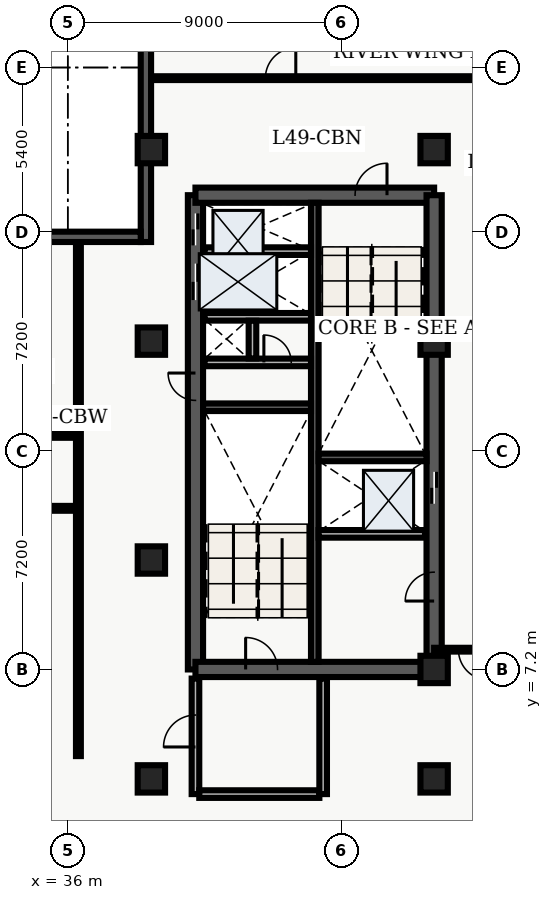
"""IFC4 building model, lengths in metres.
Left out: names, types, materials, properties, quantities, classifications, styles, units other than length and angle.
Written with IfcOpenShell. Run it as: python <this file> out.ifc"""

import sys

from ifc_helpers import new_model, entity, si_unit, converted_unit, direction, frame, origin_with_axes, origin_2d_with_axis, place, context, subcontext, project, spatial, polyline, rectangle, outline, extrude, element, fill, save


model = new_model("IFC4")
c1 = context("Model", 3, precision=1e-05, world=origin_with_axes(), true_north=direction((0.0, 1.0)))
c2 = subcontext(c1, "Body", "Model", "MODEL_VIEW")
j1 = project(units=[si_unit("LENGTHUNIT", "METRE"), converted_unit("PLANEANGLEUNIT", "DEGREE", entity("IfcPlaneAngleMeasure", 0.017), si_unit("PLANEANGLEUNIT", "RADIAN"), dimensions=[0, 0, 0, 0, 0, 0, 0])], contexts=[c1])
p1 = place(None, origin_with_axes())
s1 = spatial("IfcSite", under=j1, at=p1, CompositionType="ELEMENT")
p2 = place(p1, origin_with_axes())
s2 = spatial("IfcBuilding", under=s1, at=p2, CompositionType="ELEMENT")
p3 = place(p2, frame((0.0, 0.0, 200.4), z_axis=(0.0, 0.0, 1.0), x_axis=(1.0, 0.0, 0.0)))
s3 = spatial("IfcBuildingStorey", under=s2, at=p3, CompositionType="ELEMENT", Elevation=200.4)
p4 = place(p3, frame((40.2, 7.2, 0.0), z_axis=(0.0, 0.0, 1.0), x_axis=(0.0, 1.0, 0.0)))
e1 = element("IfcWall", 1, at=p4, inside=s3, PredefinedType="SHEAR", context=c2, shape_type="SweptSolid", body=[
    extrude(outline(polyline([(0.0, -0.25), (15.6, -0.25), (15.6, 0.25), (0.0, 0.25), (0.0, -0.25)])), origin_with_axes(), (0.0, 0.0, 1.0), 3.66),
])
p5 = place(p4, frame((14.475, 0.0, 0.0), z_axis=(0.0, 0.0, 1.0), x_axis=(1.0, 0.0, 0.0)))
e2 = element("IfcOpeningElement", 2, at=p5, cuts=e1, PredefinedType="OPENING", context=c2, shape_type="SweptSolid", body=[
    extrude(rectangle(XDim=1.05, YDim=0.52, at=origin_2d_with_axis()), origin_with_axes(), (0.0, 0.0, 1.0), 2.15),
])
p6 = place(p4, frame((12.75, 0.0, 0.0), z_axis=(0.0, 0.0, 1.0), x_axis=(1.0, 0.0, 0.0)))
e3 = element("IfcOpeningElement", 3, at=p6, cuts=e1, PredefinedType="OPENING", context=c2, shape_type="SweptSolid", body=[
    extrude(rectangle(XDim=1.2, YDim=0.52, at=origin_2d_with_axis()), origin_with_axes(), (0.0, 0.0, 1.0), 2.15),
])
p7 = place(p4, frame((9.3, 0.0, 0.0), z_axis=(0.0, 0.0, 1.0), x_axis=(1.0, 0.0, 0.0)))
e4 = element("IfcOpeningElement", 4, at=p7, cuts=e1, PredefinedType="OPENING", context=c2, shape_type="SweptSolid", body=[
    extrude(rectangle(XDim=0.9, YDim=0.52, at=origin_2d_with_axis()), origin_with_axes(), (0.0, 0.0, 1.0), 2.15),
])
p8 = place(p3, frame((40.2, 7.2, 0.0), z_axis=(0.0, 0.0, 1.0), x_axis=(1.0, 0.0, 0.0)))
e5 = element("IfcWall", 5, at=p8, inside=s3, PredefinedType="SHEAR", context=c2, shape_type="SweptSolid", body=[
    extrude(outline(polyline([(0.0, -0.25), (7.85, -0.25), (7.85, 0.25), (0.0, 0.25), (0.0, -0.25)])), origin_with_axes(), (0.0, 0.0, 1.0), 3.66),
])
p9 = place(p8, frame((2.175, 0.0, 0.0), z_axis=(0.0, 0.0, 1.0), x_axis=(1.0, 0.0, 0.0)))
e6 = element("IfcOpeningElement", 6, at=p9, cuts=e5, PredefinedType="OPENING", context=c2, shape_type="SweptSolid", body=[
    extrude(rectangle(XDim=1.05, YDim=0.52, at=origin_2d_with_axis()), origin_with_axes(), (0.0, 0.0, 1.0), 2.15),
])
p10 = place(p3, frame((40.2, 22.8, 0.0), z_axis=(0.0, 0.0, 1.0), x_axis=(1.0, 0.0, 0.0)))
e7 = element("IfcWall", 7, at=p10, inside=s3, PredefinedType="SHEAR", context=c2, shape_type="SweptSolid", body=[
    extrude(outline(polyline([(0.0, -0.25), (7.85, -0.25), (7.85, 0.25), (0.0, 0.25), (0.0, -0.25)])), origin_with_axes(), (0.0, 0.0, 1.0), 3.66),
])
p11 = place(p10, frame((5.775, 0.0, 0.0), z_axis=(0.0, 0.0, 1.0), x_axis=(1.0, 0.0, 0.0)))
e8 = element("IfcOpeningElement", 8, at=p11, cuts=e7, PredefinedType="OPENING", context=c2, shape_type="SweptSolid", body=[
    extrude(rectangle(XDim=1.05, YDim=0.52, at=origin_2d_with_axis()), origin_with_axes(), (0.0, 0.0, 1.0), 2.15),
])
p12 = place(p3, frame((48.05, 7.2, 0.0), z_axis=(0.0, 0.0, 1.0), x_axis=(0.0, 1.0, 0.0)))
e9 = element("IfcWall", 9, at=p12, inside=s3, PredefinedType="SHEAR", context=c2, shape_type="SweptSolid", body=[
    extrude(outline(polyline([(0.0, -0.25), (15.6, -0.25), (15.6, 0.25), (0.0, 0.25), (0.0, -0.25)])), origin_with_axes(), (0.0, 0.0, 1.0), 3.66),
])
p13 = place(p12, frame((5.975, 0.0, 0.0), z_axis=(0.0, 0.0, 1.0), x_axis=(1.0, 0.0, 0.0)))
e10 = element("IfcOpeningElement", 10, at=p13, cuts=e9, PredefinedType="OPENING", context=c2, shape_type="SweptSolid", body=[
    extrude(rectangle(XDim=1.05, YDim=0.52, at=origin_2d_with_axis()), origin_with_axes(), (0.0, 0.0, 1.0), 2.15),
])
p14 = place(p12, frame((2.725, 0.0, 0.0), z_axis=(0.0, 0.0, 1.0), x_axis=(1.0, 0.0, 0.0)))
e11 = element("IfcOpeningElement", 11, at=p14, cuts=e9, PredefinedType="OPENING", context=c2, shape_type="SweptSolid", body=[
    extrude(rectangle(XDim=0.95, YDim=0.52, at=origin_2d_with_axis()), origin_with_axes(), (0.0, 0.0, 1.0), 2.15),
])
p15 = place(p3, frame((44.125, 7.45, 0.0), z_axis=(0.0, 0.0, 1.0), x_axis=(0.0, 1.0, 0.0)))
e12 = element("IfcWall", 12, at=p15, inside=s3, PredefinedType="SHEAR", context=c2, shape_type="SweptSolid", body=[
    extrude(outline(polyline([(0.0, -0.125), (15.1, -0.125), (15.1, 0.125), (0.0, 0.125), (0.0, -0.125)])), origin_with_axes(), (0.0, 0.0, 1.0), 3.66),
])
for number, where, z_axis, x_axis in (
    (13, (40.45, 15.825, 0.0), (0.0, 0.0, 1.0), (1.0, 0.0, 0.0)),
    (14, (44.25, 14.175, 0.0), (0.0, 0.0, 1.0), (1.0, 0.0, 0.0)),
):
    element("IfcWall", number, at=place(p3, frame(where, z_axis=z_axis, x_axis=x_axis)), inside=s3, PredefinedType="SHEAR", context=c2, shape_type="SweptSolid", body=[
        extrude(outline(polyline([(0.0, -0.125), (3.55, -0.125), (3.55, 0.125), (0.0, 0.125), (0.0, -0.125)])), origin_with_axes(), (0.0, 0.0, 1.0), 3.66),
    ])
p16 = place(p3, frame((40.5, 17.3, 0.0), z_axis=(0.0, 0.0, 1.0), x_axis=(1.0, 0.0, 0.0)))
e15 = element("IfcWall", 15, at=p16, inside=s3, PredefinedType="SOLIDWALL", context=c2, shape_type="SweptSolid", body=[
    extrude(outline(polyline([(0.0, -0.125), (3.5, -0.125), (3.5, 0.125), (0.0, 0.125), (0.0, -0.125)])), origin_with_axes(), (0.0, 0.0, 1.0), 2.7),
])
p17 = place(p16, frame((2.4, 0.0, 0.0), z_axis=(0.0, 0.0, 1.0), x_axis=(1.0, 0.0, 0.0)))
e16 = element("IfcOpeningElement", 16, at=p17, cuts=e15, PredefinedType="OPENING", context=c2, shape_type="SweptSolid", body=[
    extrude(rectangle(XDim=0.9, YDim=0.27, at=origin_2d_with_axis()), origin_with_axes(), (0.0, 0.0, 1.0), 2.15),
])
p18 = place(p3, frame((40.5, 18.8, 0.0), z_axis=(0.0, 0.0, 1.0), x_axis=(1.0, 0.0, 0.0)))
e17 = element("IfcWall", 17, at=p18, inside=s3, PredefinedType="SOLIDWALL", context=c2, shape_type="SweptSolid", body=[
    extrude(outline(polyline([(0.0, -0.125), (3.5, -0.125), (3.5, 0.125), (0.0, 0.125), (0.0, -0.125)])), origin_with_axes(), (0.0, 0.0, 1.0), 2.7),
])
p19 = place(p3, frame((42.075, 17.43, 0.0), z_axis=(0.0, 0.0, 1.0), x_axis=(0.0, 1.0, 0.0)))
e18 = element("IfcWall", 18, at=p19, inside=s3, PredefinedType="SOLIDWALL", context=c2, shape_type="SweptSolid", body=[
    extrude(outline(polyline([(0.0, -0.125), (1.24, -0.125), (1.24, 0.125), (0.0, 0.125), (0.0, -0.125)])), origin_with_axes(), (0.0, 0.0, 1.0), 2.7),
])
p20 = place(p3, frame((40.2, 3.1, 0.0), z_axis=(0.0, 0.0, 1.0), x_axis=(0.0, 1.0, 0.0)))
e19 = element("IfcWall", 19, at=p20, inside=s3, PredefinedType="SOLIDWALL", context=c2, shape_type="SweptSolid", body=[
    extrude(outline(polyline([(0.0, -0.125), (3.8, -0.125), (3.8, 0.125), (0.0, 0.125), (0.0, -0.125)])), origin_with_axes(), (0.0, 0.0, 1.0), 2.7),
])
p21 = place(p20, frame((2.075, 0.0, 0.0), z_axis=(0.0, 0.0, 1.0), x_axis=(1.0, 0.0, 0.0)))
e20 = element("IfcOpeningElement", 20, at=p21, cuts=e19, PredefinedType="OPENING", context=c2, shape_type="SweptSolid", body=[
    extrude(rectangle(XDim=1.05, YDim=0.27, at=origin_2d_with_axis()), origin_with_axes(), (0.0, 0.0, 1.0), 2.15),
])
p22 = place(p3, frame((40.325, 3.1, 0.0), z_axis=(0.0, 0.0, 1.0), x_axis=(1.0, 0.0, 0.0)))
e21 = element("IfcWall", 21, at=p22, inside=s3, PredefinedType="SOLIDWALL", context=c2, shape_type="SweptSolid", body=[
    extrude(outline(polyline([(0.0, -0.125), (3.95, -0.125), (3.95, 0.125), (0.0, 0.125), (0.0, -0.125)])), origin_with_axes(), (0.0, 0.0, 1.0), 2.7),
])
p23 = place(p3, frame((44.4, 3.1, 0.0), z_axis=(0.0, 0.0, 1.0), x_axis=(0.0, 1.0, 0.0)))
e22 = element("IfcWall", 22, at=p23, inside=s3, PredefinedType="SOLIDWALL", context=c2, shape_type="SweptSolid", body=[
    extrude(outline(polyline([(0.0, -0.125), (3.8, -0.125), (3.8, 0.125), (0.0, 0.125), (0.0, -0.125)])), origin_with_axes(), (0.0, 0.0, 1.0), 2.7),
])
for number, where, z_axis, x_axis in (
    (23, (38.75, 3.6, 0.0), (0.0, 0.0, 1.0), (1.0, 0.0, 0.0)),
    (24, (38.75, 10.8, 0.0), (0.0, 0.0, 1.0), (1.0, 0.0, 0.0)),
    (25, (38.75, 18.0, 0.0), (0.0, 0.0, 1.0), (1.0, 0.0, 0.0)),
    (26, (38.75, 24.3, 0.0), (0.0, 0.0, 1.0), (1.0, 0.0, 0.0)),
    (27, (48.05, 3.6, 0.0), (0.0, 0.0, 1.0), (1.0, 0.0, 0.0)),
    (28, (48.05, 7.2, 0.0), (0.0, 0.0, 1.0), (1.0, 0.0, 0.0)),
    (29, (48.05, 18.0, 0.0), (0.0, 0.0, 1.0), (1.0, 0.0, 0.0)),
    (30, (48.05, 24.3, 0.0), (0.0, 0.0, 1.0), (1.0, 0.0, 0.0)),
):
    element("IfcColumn", number, at=place(p3, frame(where, z_axis=z_axis, x_axis=x_axis)), inside=s3, PredefinedType="COLUMN", context=c2, shape_type="SweptSolid", body=[
        extrude(rectangle(XDim=0.9, YDim=0.9, at=origin_2d_with_axis()), origin_with_axes(), (0.0, 0.0, 1.0), 3.9),
    ])
for number, where, z_axis, x_axis in (
    (31, (40.5, 20.96, 0.0), (0.0, 0.0, 1.0), (1.0, 0.0, 0.0)),
    (32, (44.25, 11.66, 0.0), (0.0, 0.0, 1.0), (1.0, 0.0, 0.0)),
):
    element("IfcWall", number, at=place(p3, frame(where, z_axis=z_axis, x_axis=x_axis)), inside=s3, PredefinedType="SOLIDWALL", context=c2, shape_type="SweptSolid", body=[
        extrude(outline(polyline([(0.0, -0.125), (3.5, -0.125), (3.5, 0.125), (0.0, 0.125), (0.0, -0.125)])), origin_with_axes(), (0.0, 0.0, 1.0), 2.7),
    ])
p24 = place(p3, frame((21.15, 12.5, 0.0), z_axis=(0.0, 0.0, 1.0), x_axis=(1.0, 0.0, 0.0)))
e33 = element("IfcWall", 33, at=p24, inside=s3, PredefinedType="PARTITIONING", context=c2, shape_type="SweptSolid", body=[
    extrude(outline(polyline([(0.0, -0.08), (15.2, -0.08), (15.2, 0.08), (0.0, 0.08), (0.0, -0.08)])), origin_with_axes(), (0.0, 0.0, 1.0), 2.7),
])
p25 = place(p24, frame((1.758, 0.0, 0.0), z_axis=(0.0, 0.0, 1.0), x_axis=(1.0, 0.0, 0.0)))
e34 = element("IfcOpeningElement", 34, at=p25, cuts=e33, PredefinedType="OPENING", context=c2, shape_type="SweptSolid", body=[
    extrude(rectangle(XDim=1.0, YDim=0.18, at=origin_2d_with_axis()), origin_with_axes(), (0.0, 0.0, 1.0), 2.15),
])
p26 = place(p24, frame((4.893, 0.0, 0.0), z_axis=(0.0, 0.0, 1.0), x_axis=(1.0, 0.0, 0.0)))
e35 = element("IfcOpeningElement", 35, at=p26, cuts=e33, PredefinedType="OPENING", context=c2, shape_type="SweptSolid", body=[
    extrude(rectangle(XDim=1.0, YDim=0.18, at=origin_2d_with_axis()), origin_with_axes(), (0.0, 0.0, 1.0), 2.15),
])
p27 = place(p24, frame((8.555, 0.0, 0.0), z_axis=(0.0, 0.0, 1.0), x_axis=(1.0, 0.0, 0.0)))
e36 = element("IfcOpeningElement", 36, at=p27, cuts=e33, PredefinedType="OPENING", context=c2, shape_type="SweptSolid", body=[
    extrude(rectangle(XDim=1.0, YDim=0.18, at=origin_2d_with_axis()), origin_with_axes(), (0.0, 0.0, 1.0), 2.15),
])
p28 = place(p24, frame((12.889, 0.0, 0.0), z_axis=(0.0, 0.0, 1.0), x_axis=(1.0, 0.0, 0.0)))
e37 = element("IfcOpeningElement", 37, at=p28, cuts=e33, PredefinedType="OPENING", context=c2, shape_type="SweptSolid", body=[
    extrude(rectangle(XDim=1.0, YDim=0.18, at=origin_2d_with_axis()), origin_with_axes(), (0.0, 0.0, 1.0), 2.15),
])
p29 = place(p3, frame((21.15, 14.9, 0.0), z_axis=(0.0, 0.0, 1.0), x_axis=(1.0, 0.0, 0.0)))
e38 = element("IfcWall", 38, at=p29, inside=s3, PredefinedType="PARTITIONING", context=c2, shape_type="SweptSolid", body=[
    extrude(outline(polyline([(0.0, -0.08), (15.2, -0.08), (15.2, 0.08), (0.0, 0.08), (0.0, -0.08)])), origin_with_axes(), (0.0, 0.0, 1.0), 2.7),
])
p30 = place(p29, frame((7.65, 0.0, 0.0), z_axis=(0.0, 0.0, 1.0), x_axis=(1.0, 0.0, 0.0)))
e39 = element("IfcOpeningElement", 39, at=p30, cuts=e38, PredefinedType="OPENING", context=c2, shape_type="SweptSolid", body=[
    extrude(rectangle(XDim=1.0, YDim=0.18, at=origin_2d_with_axis()), origin_with_axes(), (0.0, 0.0, 1.0), 2.15),
])
p31 = place(p3, frame((36.35, 4.35, 0.0), z_axis=(0.0, 0.0, 1.0), x_axis=(0.0, 1.0, 0.0)))
e40 = element("IfcWall", 40, at=p31, inside=s3, PredefinedType="PARTITIONING", context=c2, shape_type="SweptSolid", body=[
    extrude(outline(polyline([(0.0, -0.08), (16.95, -0.08), (16.95, 0.08), (0.0, 0.08), (0.0, -0.08)])), origin_with_axes(), (0.0, 0.0, 1.0), 2.7),
])
p32 = place(p3, frame((59.665, 7.85, 0.0), z_axis=(0.0, 0.0, 1.0), x_axis=(-1.0, 0.0, 0.0)))
e41 = element("IfcWall", 41, at=p32, inside=s3, PredefinedType="PARTITIONING", context=c2, shape_type="SweptSolid", body=[
    extrude(outline(polyline([(0.0, -0.062), (11.615, -0.062), (11.615, 0.062), (0.0, 0.062), (0.0, -0.062)])), origin_with_axes(), (0.0, 0.0, 1.0), 2.7),
])
p33 = place(p32, frame((10.315, 0.0, 0.0), z_axis=(0.0, 0.0, 1.0), x_axis=(1.0, 0.0, 0.0)))
e42 = element("IfcOpeningElement", 42, at=p33, cuts=e41, PredefinedType="OPENING", context=c2, shape_type="SweptSolid", body=[
    extrude(rectangle(XDim=1.0, YDim=0.145, at=origin_2d_with_axis()), origin_with_axes(), (0.0, 0.0, 1.0), 2.15),
])
p34 = place(p3, frame((38.735, 26.65, 0.0), z_axis=(0.0, 0.0, 1.0), x_axis=(1.0, 0.0, 0.0)))
e43 = element("IfcWall", 43, at=p34, inside=s3, PredefinedType="PARTITIONING", context=c2, shape_type="SweptSolid", body=[
    extrude(outline(polyline([(0.0, -0.062), (20.905, -0.062), (20.905, 0.062), (0.0, 0.062), (0.0, -0.062)])), origin_with_axes(), (0.0, 0.0, 1.0), 2.7),
])
p35 = place(p34, frame((4.265, 0.0, 0.0), z_axis=(0.0, 0.0, 1.0), x_axis=(1.0, 0.0, 0.0)))
e44 = element("IfcOpeningElement", 44, at=p35, cuts=e43, PredefinedType="OPENING", context=c2, shape_type="SweptSolid", body=[
    extrude(rectangle(XDim=1.0, YDim=0.145, at=origin_2d_with_axis()), origin_with_axes(), (0.0, 0.0, 1.0), 2.15),
])
p36 = place(p3, frame((38.57, 21.26, 0.0), z_axis=(0.0, 0.0, 1.0), x_axis=(0.0, 1.0, 0.0)))
e45 = element("IfcWall", 45, at=p36, inside=s3, PredefinedType="SOLIDWALL", context=c2, shape_type="SweptSolid", body=[
    extrude(outline(polyline([(0.0, -0.17), (7.54, -0.17), (7.54, 0.17), (0.0, 0.17), (0.0, -0.17)])), origin_with_axes(), (0.0, 0.0, 1.0), 3.66),
])
p37 = place(p3, frame((28.772, 21.43, 0.0), z_axis=(0.0, 0.0, 1.0), x_axis=(1.0, 0.0, 0.0)))
e46 = element("IfcWall", 46, at=p37, inside=s3, PredefinedType="SOLIDWALL", context=c2, shape_type="SweptSolid", body=[
    extrude(outline(polyline([(0.0, -0.17), (9.628, -0.17), (9.628, 0.17), (0.0, 0.17), (0.0, -0.17)])), origin_with_axes(), (0.0, 0.0, 1.0), 3.66),
])
p38 = place(p37, frame((4.814, 0.0, 0.45), z_axis=(0.0, 0.0, 1.0), x_axis=(1.0, 0.0, 0.0)))
e47 = element("IfcOpeningElement", 47, at=p38, cuts=e46, PredefinedType="OPENING", context=c2, shape_type="SweptSolid", body=[
    extrude(rectangle(XDim=1.8, YDim=0.36, at=origin_2d_with_axis()), origin_with_axes(), (0.0, 0.0, 1.0), 2.1),
])
p39 = place(p12, frame((5.975, 0.0, 0.0), z_axis=(0.0, 0.0, 1.0), x_axis=(1.0, 0.0, 0.0)))
e48 = element("IfcDoor", 48, at=p39, inside=s3, OperationType="SLIDING_TO_LEFT", PredefinedType="DOOR", context=c2, shape_type="SweptSolid", body=[
    extrude(rectangle(XDim=1.05, YDim=0.09, at=origin_2d_with_axis()), origin_with_axes(), (0.0, 0.0, 1.0), 2.15),
])
fill(e10, e48)
p40 = place(p4, frame((14.475, 0.0, 0.0), z_axis=(0.0, 0.0, 1.0), x_axis=(1.0, 0.0, 0.0)))
e49 = element("IfcDoor", 49, at=p40, inside=s3, OperationType="SLIDING_TO_RIGHT", PredefinedType="DOOR", context=c2, shape_type="SweptSolid", body=[
    extrude(rectangle(XDim=1.05, YDim=0.09, at=origin_2d_with_axis()), origin_with_axes(), (0.0, 0.0, 1.0), 2.15),
])
fill(e2, e49)
p41 = place(p4, frame((12.75, 0.0, 0.0), z_axis=(0.0, 0.0, 1.0), x_axis=(1.0, 0.0, 0.0)))
e50 = element("IfcDoor", 50, at=p41, inside=s3, OperationType="DOUBLE_DOOR_SLIDING", PredefinedType="DOOR", context=c2, shape_type="SweptSolid", body=[
    extrude(rectangle(XDim=1.2, YDim=0.09, at=origin_2d_with_axis()), origin_with_axes(), (0.0, 0.0, 1.0), 2.15),
])
fill(e3, e50)
p42 = place(p4, frame((9.3, 0.0, 0.0), z_axis=(0.0, 0.0, 1.0), x_axis=(1.0, 0.0, 0.0)))
e51 = element("IfcDoor", 51, at=p42, inside=s3, OperationType="SINGLE_SWING_RIGHT", PredefinedType="DOOR", context=c2, shape_type="SweptSolid", body=[
    extrude(rectangle(XDim=0.9, YDim=0.09, at=origin_2d_with_axis()), origin_with_axes(), (0.0, 0.0, 1.0), 2.15),
])
fill(e4, e51)
p43 = place(p16, frame((2.4, 0.0, 0.0), z_axis=(0.0, 0.0, 1.0), x_axis=(1.0, 0.0, 0.0)))
e52 = element("IfcDoor", 52, at=p43, inside=s3, OperationType="SINGLE_SWING_LEFT", PredefinedType="DOOR", context=c2, shape_type="SweptSolid", body=[
    extrude(rectangle(XDim=0.9, YDim=0.09, at=origin_2d_with_axis()), origin_with_axes(), (0.0, 0.0, 1.0), 2.15),
])
fill(e16, e52)
p44 = place(p8, frame((2.175, 0.0, 0.0), z_axis=(0.0, 0.0, 1.0), x_axis=(1.0, 0.0, 0.0)))
e53 = element("IfcDoor", 53, at=p44, inside=s3, OperationType="SINGLE_SWING_LEFT", PredefinedType="DOOR", context=c2, shape_type="SweptSolid", body=[
    extrude(rectangle(XDim=1.05, YDim=0.09, at=origin_2d_with_axis()), origin_with_axes(), (0.0, 0.0, 1.0), 2.15),
])
fill(e6, e53)
p45 = place(p10, frame((5.775, 0.0, 0.0), z_axis=(0.0, 0.0, 1.0), x_axis=(1.0, 0.0, 0.0)))
e54 = element("IfcDoor", 54, at=p45, inside=s3, OperationType="SINGLE_SWING_RIGHT", PredefinedType="DOOR", context=c2, shape_type="SweptSolid", body=[
    extrude(rectangle(XDim=1.05, YDim=0.09, at=origin_2d_with_axis()), origin_with_axes(), (0.0, 0.0, 1.0), 2.15),
])
fill(e8, e54)
p46 = place(p20, frame((2.075, 0.0, 0.0), z_axis=(0.0, 0.0, 1.0), x_axis=(1.0, 0.0, 0.0)))
e55 = element("IfcDoor", 55, at=p46, inside=s3, OperationType="SINGLE_SWING_LEFT", PredefinedType="DOOR", context=c2, shape_type="SweptSolid", body=[
    extrude(rectangle(XDim=1.05, YDim=0.09, at=origin_2d_with_axis()), origin_with_axes(), (0.0, 0.0, 1.0), 2.15),
])
fill(e20, e55)
p47 = place(p12, frame((2.725, 0.0, 0.0), z_axis=(0.0, 0.0, 1.0), x_axis=(1.0, 0.0, 0.0)))
e56 = element("IfcDoor", 56, at=p47, inside=s3, OperationType="SINGLE_SWING_LEFT", PredefinedType="DOOR", context=c2, shape_type="SweptSolid", body=[
    extrude(rectangle(XDim=0.95, YDim=0.09, at=origin_2d_with_axis()), origin_with_axes(), (0.0, 0.0, 1.0), 2.15),
])
fill(e11, e56)
p48 = place(p32, frame((10.315, 0.0, 0.0), z_axis=(0.0, 0.0, 1.0), x_axis=(1.0, 0.0, 0.0)))
e57 = element("IfcDoor", 57, at=p48, inside=s3, OperationType="SINGLE_SWING_LEFT", PredefinedType="DOOR", context=c2, shape_type="SweptSolid", body=[
    extrude(rectangle(XDim=1.0, YDim=0.075, at=origin_2d_with_axis()), origin_with_axes(), (0.0, 0.0, 1.0), 2.15),
])
fill(e42, e57)
p49 = place(p34, frame((4.265, 0.0, 0.0), z_axis=(0.0, 0.0, 1.0), x_axis=(1.0, 0.0, 0.0)))
e58 = element("IfcDoor", 58, at=p49, inside=s3, OperationType="SINGLE_SWING_RIGHT", PredefinedType="DOOR", context=c2, shape_type="SweptSolid", body=[
    extrude(rectangle(XDim=1.0, YDim=0.075, at=origin_2d_with_axis()), origin_with_axes(), (0.0, 0.0, 1.0), 2.15),
])
fill(e44, e58)
save(model, sys.argv[1])
